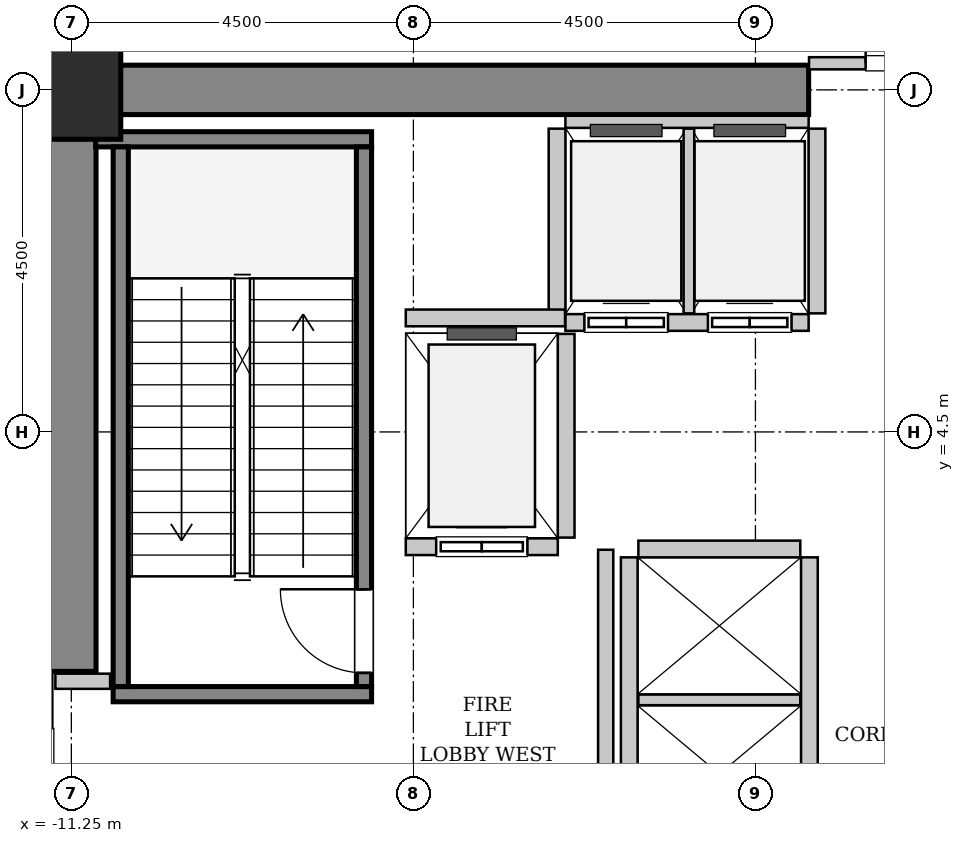
"""IFC4 building model, lengths in metres.
Left out: names, types, materials, properties, quantities, classifications, styles, units other than length and angle.
Written with IfcOpenShell. Run it as: python <this file> out.ifc"""

import sys

from ifc_helpers import new_model, si_unit, direction, frame, frame_2d, origin, origin_2d, place, context, subcontext, project, spatial, rectangle, hollow_rectangle, extrude, source, transform, mapped, element, fill, save


model = new_model("IFC4")
c1 = context("Model", 3, precision=1e-05, world=origin(), true_north=direction((0.0, 1.0)))
c2 = subcontext(c1, "Body", "Model", "MODEL_VIEW")
j1 = project(units=[si_unit("LENGTHUNIT", "METRE"), si_unit("PLANEANGLEUNIT", "RADIAN")], contexts=[c1])
p1 = place(None, origin())
s1 = spatial("IfcSite", under=j1, at=p1, CompositionType="ELEMENT")
p2 = place(p1, origin())
s2 = spatial("IfcBuilding", under=s1, at=p2, CompositionType="ELEMENT")
p3 = place(p2, frame((0.0, 0.0, 22.2)))
s3 = spatial("IfcBuildingStorey", under=s2, at=p3, CompositionType="ELEMENT", Elevation=22.2)
m1 = source(origin(), c2, "Body", "SweptSolid", [
    extrude(rectangle(XDim=10.025, YDim=0.65, at=frame_2d((5.012, 0.0))), origin(), (0.0, 0.0, 1.0), 5.4),
])
p4 = place(p3, frame((-11.575, 9.0, 0.0), z_axis=(0.0, 0.0, 1.0), x_axis=(1.0, 0.0, 0.0)))
e1 = element("IfcWall", 1, at=p4, inside=s3, PredefinedType="SHEAR", context=c2, shape_type="MappedRepresentation", body=[
    mapped(m1, transform((0.0, 0.0, 0.0), x_axis=(1.0, 0.0, 0.0), y_axis=(0.0, 1.0, 0.0), z_axis=(0.0, 0.0, 1.0), scale=1.0)),
])
m2 = source(origin(), c2, "Body", "SweptSolid", [
    extrude(rectangle(XDim=7.325, YDim=0.65, at=frame_2d((3.663, 0.0))), origin(), (0.0, 0.0, 1.0), 5.4),
])
p5 = place(p3, frame((-11.25, 1.35, 0.0), z_axis=(0.0, 0.0, 1.0), x_axis=(0.0, 1.0, 0.0)))
e2 = element("IfcWall", 2, at=p5, inside=s3, PredefinedType="SHEAR", context=c2, shape_type="MappedRepresentation", body=[
    mapped(m2, transform((0.0, 0.0, 0.0), x_axis=(1.0, 0.0, 0.0), y_axis=(0.0, 1.0, 0.0), z_axis=(0.0, 0.0, 1.0), scale=1.0)),
])
m3 = source(origin(), c2, "Body", "SweptSolid", [
    extrude(hollow_rectangle(XDim=1.3, YDim=1.3, WallThickness=0.065, InnerFilletRadius=0.065, OuterFilletRadius=0.13, at=origin_2d()), origin(), (0.0, 0.0, 1.0), 5.4),
])
p6 = place(p3, frame((-11.25, 9.0, 0.0), z_axis=(0.0, 0.0, 1.0), x_axis=(1.0, 0.0, 0.0)))
e3 = element("IfcColumn", 3, at=p6, inside=s3, PredefinedType="COLUMN", context=c2, shape_type="MappedRepresentation", body=[
    mapped(m3, transform((0.0, 0.0, 0.0), x_axis=(1.0, 0.0, 0.0), y_axis=(0.0, 1.0, 0.0), z_axis=(0.0, 0.0, 1.0), scale=1.0)),
])
m4 = source(origin(), c2, "Body", "SweptSolid", [
    extrude(rectangle(XDim=3.4, YDim=0.2, at=frame_2d((1.7, 0.0))), origin(), (0.0, 0.0, 1.0), 5.4),
])
p7 = place(p3, frame((-7.3, 1.05, 0.0), z_axis=(0.0, 0.0, 1.0), x_axis=(-1.0, 0.0, 0.0)))
e4 = element("IfcWall", 4, at=p7, inside=s3, PredefinedType="SOLIDWALL", context=c2, shape_type="MappedRepresentation", body=[
    mapped(m4, transform((0.0, 0.0, 0.0), x_axis=(1.0, 0.0, 0.0), y_axis=(0.0, 1.0, 0.0), z_axis=(0.0, 0.0, 1.0), scale=1.0)),
])
m5 = source(origin(), c2, "Body", "SweptSolid", [
    extrude(rectangle(XDim=3.63, YDim=0.2, at=frame_2d((1.815, 0.0))), origin(), (0.0, 0.0, 1.0), 5.4),
])
p8 = place(p3, frame((-7.3, 8.35, 0.0), z_axis=(0.0, 0.0, 1.0), x_axis=(-1.0, 0.0, 0.0)))
e5 = element("IfcWall", 5, at=p8, inside=s3, PredefinedType="SOLIDWALL", context=c2, shape_type="MappedRepresentation", body=[
    mapped(m5, transform((0.0, 0.0, 0.0), x_axis=(1.0, 0.0, 0.0), y_axis=(0.0, 1.0, 0.0), z_axis=(0.0, 0.0, 1.0), scale=1.0)),
])
m6 = source(origin(), c2, "Body", "SweptSolid", [
    extrude(rectangle(XDim=7.1, YDim=0.2, at=frame_2d((3.55, 0.0))), origin(), (0.0, 0.0, 1.0), 5.4),
])
p9 = place(p3, frame((-7.4, 1.15, 0.0), z_axis=(0.0, 0.0, 1.0), x_axis=(0.0, 1.0, 0.0)))
e6 = element("IfcWall", 6, at=p9, inside=s3, PredefinedType="SOLIDWALL", context=c2, shape_type="MappedRepresentation", body=[
    mapped(m6, transform((0.0, 0.0, 0.0), x_axis=(1.0, 0.0, 0.0), y_axis=(0.0, 1.0, 0.0), z_axis=(0.0, 0.0, 1.0), scale=1.0)),
])
p10 = place(p9, frame((0.18, 0.0, 0.0)))
e7 = element("IfcOpeningElement", 7, at=p10, cuts=e6, PredefinedType="OPENING", context=c2, shape_type="SweptSolid", body=[
    extrude(rectangle(XDim=1.1, YDim=2.15, at=frame_2d((0.55, 1.075))), frame((0.0, 0.11, 0.0), z_axis=(0.0, -1.0, 0.0), x_axis=(1.0, 0.0, 0.0)), (0.0, 0.0, 1.0), 0.22),
])
p11 = place(p3, frame((-10.6, 1.15, 0.0), z_axis=(0.0, 0.0, 1.0), x_axis=(0.0, 1.0, 0.0)))
e8 = element("IfcWall", 8, at=p11, inside=s3, PredefinedType="SOLIDWALL", context=c2, shape_type="MappedRepresentation", body=[
    mapped(m6, transform((0.0, 0.0, 0.0), x_axis=(1.0, 0.0, 0.0), y_axis=(0.0, 1.0, 0.0), z_axis=(0.0, 0.0, 1.0), scale=1.0)),
])
m7 = source(origin(), c2, "Body", "SweptSolid", [
    extrude(rectangle(XDim=2.0, YDim=0.22, at=frame_2d((1.0, 0.0))), origin(), (0.0, 0.0, 1.0), 4.905),
])
p12 = place(p3, frame((-6.85, 2.99, 0.0), z_axis=(0.0, 0.0, 1.0), x_axis=(1.0, 0.0, 0.0)))
e9 = element("IfcWall", 9, at=p12, inside=s3, PredefinedType="SOLIDWALL", context=c2, shape_type="MappedRepresentation", body=[
    mapped(m7, transform((0.0, 0.0, 0.0), x_axis=(1.0, 0.0, 0.0), y_axis=(0.0, 1.0, 0.0), z_axis=(0.0, 0.0, 1.0), scale=1.0)),
])
p13 = place(p12, frame((0.4, 0.0, 0.0)))
e10 = element("IfcOpeningElement", 10, at=p13, cuts=e9, PredefinedType="OPENING", context=c2, shape_type="SweptSolid", body=[
    extrude(rectangle(XDim=1.2, YDim=2.2, at=frame_2d((0.6, 1.1))), frame((0.0, 0.12, 0.0), z_axis=(0.0, -1.0, 0.0), x_axis=(1.0, 0.0, 0.0)), (0.0, 0.0, 1.0), 0.24),
])
m8 = source(origin(), c2, "Body", "SweptSolid", [
    extrude(rectangle(XDim=2.68, YDim=0.22, at=frame_2d((1.34, 0.0))), origin(), (0.0, 0.0, 1.0), 4.905),
])
p14 = place(p3, frame((-4.74, 3.11, 0.0), z_axis=(0.0, 0.0, 1.0), x_axis=(0.0, 1.0, 0.0)))
e11 = element("IfcWall", 11, at=p14, inside=s3, PredefinedType="SOLIDWALL", context=c2, shape_type="MappedRepresentation", body=[
    mapped(m8, transform((0.0, 0.0, 0.0), x_axis=(1.0, 0.0, 0.0), y_axis=(0.0, 1.0, 0.0), z_axis=(0.0, 0.0, 1.0), scale=1.0)),
])
m9 = source(origin(), c2, "Body", "SweptSolid", [
    extrude(rectangle(XDim=3.2, YDim=0.22, at=frame_2d((1.6, 0.0))), origin(), (0.0, 0.0, 1.0), 4.905),
])
p15 = place(p3, frame((-4.75, 5.94, 0.0), z_axis=(0.0, 0.0, 1.0), x_axis=(1.0, 0.0, 0.0)))
e12 = element("IfcWall", 12, at=p15, inside=s3, PredefinedType="SOLIDWALL", context=c2, shape_type="MappedRepresentation", body=[
    mapped(m9, transform((0.0, 0.0, 0.0), x_axis=(1.0, 0.0, 0.0), y_axis=(0.0, 1.0, 0.0), z_axis=(0.0, 0.0, 1.0), scale=1.0)),
])
p16 = place(p15, frame((0.25, 0.0, 0.0)))
e13 = element("IfcOpeningElement", 13, at=p16, cuts=e12, PredefinedType="OPENING", context=c2, shape_type="SweptSolid", body=[
    extrude(rectangle(XDim=1.1, YDim=2.2, at=frame_2d((0.55, 1.1))), frame((0.0, 0.12, 0.0), z_axis=(0.0, -1.0, 0.0), x_axis=(1.0, 0.0, 0.0)), (0.0, 0.0, 1.0), 0.24),
])
p17 = place(p15, frame((1.875, 0.0, 0.0)))
e14 = element("IfcOpeningElement", 14, at=p17, cuts=e12, PredefinedType="OPENING", context=c2, shape_type="SweptSolid", body=[
    extrude(rectangle(XDim=1.1, YDim=2.2, at=frame_2d((0.55, 1.1))), frame((0.0, 0.12, 0.0), z_axis=(0.0, -1.0, 0.0), x_axis=(1.0, 0.0, 0.0)), (0.0, 0.0, 1.0), 0.24),
])
m10 = source(origin(), c2, "Body", "SweptSolid", [
    extrude(rectangle(XDim=3.2, YDim=0.16, at=frame_2d((1.6, 0.0))), origin(), (0.0, 0.0, 1.0), 3.795),
])
p18 = place(p3, frame((-1.55, 8.58, 0.0), z_axis=(0.0, 0.0, 1.0), x_axis=(-1.0, 0.0, 0.0)))
e15 = element("IfcWall", 15, at=p18, inside=s3, PredefinedType="PARTITIONING", context=c2, shape_type="MappedRepresentation", body=[
    mapped(m10, transform((0.0, 0.0, 0.0), x_axis=(1.0, 0.0, 0.0), y_axis=(0.0, 1.0, 0.0), z_axis=(0.0, 0.0, 1.0), scale=1.0)),
])
m11 = source(origin(), c2, "Body", "SweptSolid", [
    extrude(rectangle(XDim=2.43, YDim=0.22, at=frame_2d((1.215, 0.0))), origin(), (0.0, 0.0, 1.0), 4.905),
])
p19 = place(p3, frame((-4.86, 8.49, 0.0), z_axis=(0.0, 0.0, 1.0), x_axis=(0.0, -1.0, 0.0)))
e16 = element("IfcWall", 16, at=p19, inside=s3, PredefinedType="SOLIDWALL", context=c2, shape_type="MappedRepresentation", body=[
    mapped(m11, transform((0.0, 0.0, 0.0), x_axis=(1.0, 0.0, 0.0), y_axis=(0.0, 1.0, 0.0), z_axis=(0.0, 0.0, 1.0), scale=1.0)),
])
m12 = source(origin(), c2, "Body", "SweptSolid", [
    extrude(rectangle(XDim=2.43, YDim=0.14, at=frame_2d((1.215, 0.0))), origin(), (0.0, 0.0, 1.0), 4.905),
])
p20 = place(p3, frame((-3.125, 6.06, 0.0), z_axis=(0.0, 0.0, 1.0), x_axis=(0.0, 1.0, 0.0)))
e17 = element("IfcWall", 17, at=p20, inside=s3, PredefinedType="PARTITIONING", context=c2, shape_type="MappedRepresentation", body=[
    mapped(m12, transform((0.0, 0.0, 0.0), x_axis=(1.0, 0.0, 0.0), y_axis=(0.0, 1.0, 0.0), z_axis=(0.0, 0.0, 1.0), scale=1.0)),
])
p21 = place(p3, frame((-1.44, 6.06, 0.0), z_axis=(0.0, 0.0, 1.0), x_axis=(0.0, 1.0, 0.0)))
e18 = element("IfcWall", 18, at=p21, inside=s3, PredefinedType="SOLIDWALL", context=c2, shape_type="MappedRepresentation", body=[
    mapped(m11, transform((0.0, 0.0, 0.0), x_axis=(1.0, 0.0, 0.0), y_axis=(0.0, 1.0, 0.0), z_axis=(0.0, 0.0, 1.0), scale=1.0)),
])
m13 = source(origin(), c2, "Body", "SweptSolid", [
    extrude(rectangle(XDim=5.7, YDim=0.22, at=frame_2d((2.85, 0.0))), origin(), (0.0, 0.0, 1.0), 4.905),
])
for number, where, z_axis, x_axis in (
    (19, (-1.54, -2.85, 0.0), (0.0, 0.0, 1.0), (0.0, 1.0, 0.0)),
    (20, (-3.91, 2.85, 0.0), (0.0, 0.0, 1.0), (0.0, -1.0, 0.0)),
):
    element("IfcWall", number, at=place(p3, frame(where, z_axis=z_axis, x_axis=x_axis)), inside=s3, PredefinedType="SOLIDWALL", context=c2, shape_type="MappedRepresentation", body=[
        mapped(m13, transform((0.0, 0.0, 0.0), x_axis=(1.0, 0.0, 0.0), y_axis=(0.0, 1.0, 0.0), z_axis=(0.0, 0.0, 1.0), scale=1.0)),
    ])
m14 = source(origin(), c2, "Body", "SweptSolid", [
    extrude(rectangle(XDim=2.13, YDim=0.14, at=frame_2d((1.065, 0.0))), origin(), (0.0, 0.0, 1.0), 4.905),
])
p22 = place(p3, frame((-3.79, 0.975, 0.0), z_axis=(0.0, 0.0, 1.0), x_axis=(1.0, 0.0, 0.0)))
e21 = element("IfcWall", 21, at=p22, inside=s3, PredefinedType="PARTITIONING", context=c2, shape_type="MappedRepresentation", body=[
    mapped(m14, transform((0.0, 0.0, 0.0), x_axis=(1.0, 0.0, 0.0), y_axis=(0.0, 1.0, 0.0), z_axis=(0.0, 0.0, 1.0), scale=1.0)),
])
m15 = source(origin(), c2, "Body", "SweptSolid", [
    extrude(rectangle(XDim=2.13, YDim=0.22, at=frame_2d((1.065, 0.0))), origin(), (0.0, 0.0, 1.0), 4.905),
])
p23 = place(p3, frame((-1.66, 2.96, 0.0), z_axis=(0.0, 0.0, 1.0), x_axis=(-1.0, 0.0, 0.0)))
e22 = element("IfcWall", 22, at=p23, inside=s3, PredefinedType="SOLIDWALL", context=c2, shape_type="MappedRepresentation", body=[
    mapped(m15, transform((0.0, 0.0, 0.0), x_axis=(1.0, 0.0, 0.0), y_axis=(0.0, 1.0, 0.0), z_axis=(0.0, 0.0, 1.0), scale=1.0)),
])
m16 = source(origin(), c2, "Body", "SweptSolid", [
    extrude(rectangle(XDim=2.095, YDim=0.22, at=frame_2d((1.048, 0.0))), origin(), (0.0, 0.0, 1.0), 4.905),
])
p24 = place(p3, frame((-6.85, 6.0, 0.0), z_axis=(0.0, 0.0, 1.0), x_axis=(1.0, 0.0, 0.0)))
e23 = element("IfcWall", 23, at=p24, inside=s3, PredefinedType="SOLIDWALL", context=c2, shape_type="MappedRepresentation", body=[
    mapped(m16, transform((0.0, 0.0, 0.0), x_axis=(1.0, 0.0, 0.0), y_axis=(0.0, 1.0, 0.0), z_axis=(0.0, 0.0, 1.0), scale=1.0)),
])
m17 = source(origin(), c2, "Body", "SweptSolid", [
    extrude(rectangle(XDim=5.9, YDim=0.2, at=frame_2d((2.95, 0.0))), origin(), (0.0, 0.0, 1.0), 4.905),
])
p25 = place(p3, frame((-4.22, -2.95, 0.0), z_axis=(0.0, 0.0, 1.0), x_axis=(0.0, 1.0, 0.0)))
e24 = element("IfcWall", 24, at=p25, inside=s3, PredefinedType="PARTITIONING", context=c2, shape_type="MappedRepresentation", body=[
    mapped(m17, transform((0.0, 0.0, 0.0), x_axis=(1.0, 0.0, 0.0), y_axis=(0.0, 1.0, 0.0), z_axis=(0.0, 0.0, 1.0), scale=1.0)),
])
m18 = source(origin(), c2, "Body", "SweptSolid", [
    extrude(rectangle(XDim=0.72, YDim=0.2, at=frame_2d((0.36, 0.0))), origin(), (0.0, 0.0, 1.0), 4.905),
])
p26 = place(p3, frame((-11.46, 1.22, 0.0), z_axis=(0.0, 0.0, 1.0), x_axis=(1.0, 0.0, 0.0)))
e25 = element("IfcWall", 25, at=p26, inside=s3, PredefinedType="PARTITIONING", context=c2, shape_type="MappedRepresentation", body=[
    mapped(m18, transform((0.0, 0.0, 0.0), x_axis=(1.0, 0.0, 0.0), y_axis=(0.0, 1.0, 0.0), z_axis=(0.0, 0.0, 1.0), scale=1.0)),
])
m19 = source(origin(), c2, "Body", "SweptSolid", [
    extrude(rectangle(XDim=3.09, YDim=0.16, at=frame_2d((1.545, 0.0))), origin(), (0.0, 0.0, 1.0), 3.795),
])
p27 = place(p3, frame((-1.545, 9.35, 0.0), z_axis=(0.0, 0.0, 1.0), x_axis=(1.0, 0.0, 0.0)))
e26 = element("IfcWall", 26, at=p27, inside=s3, PredefinedType="PARTITIONING", context=c2, shape_type="MappedRepresentation", body=[
    mapped(m19, transform((0.0, 0.0, 0.0), x_axis=(1.0, 0.0, 0.0), y_axis=(0.0, 1.0, 0.0), z_axis=(0.0, 0.0, 1.0), scale=1.0)),
])
p28 = place(p27, frame((0.745, 0.0, 0.0)))
e27 = element("IfcOpeningElement", 27, at=p28, cuts=e26, PredefinedType="OPENING", context=c2, shape_type="SweptSolid", body=[
    extrude(rectangle(XDim=1.6, YDim=2.3, at=frame_2d((0.8, 1.15))), frame((0.0, 0.09, 0.0), z_axis=(0.0, -1.0, 0.0), x_axis=(1.0, 0.0, 0.0)), (0.0, 0.0, 1.0), 0.18),
])
m20 = source(origin(), c2, "Body", "SweptSolid", [
    extrude(rectangle(XDim=1.1, YDim=2.15, at=frame_2d((0.55, 1.075))), frame((0.0, 0.025, 0.0), z_axis=(0.0, -1.0, 0.0), x_axis=(1.0, 0.0, 0.0)), (0.0, 0.0, 1.0), 0.05),
])
p29 = place(p10, origin())
e28 = element("IfcDoor", 28, at=p29, inside=s3, OperationType="SINGLE_SWING_RIGHT", PredefinedType="DOOR", context=c2, shape_type="MappedRepresentation", body=[
    mapped(m20, transform((0.0, 0.0, 0.0), x_axis=(1.0, 0.0, 0.0), y_axis=(0.0, 1.0, 0.0), z_axis=(0.0, 0.0, 1.0), scale=1.0)),
])
fill(e7, e28)
m21 = source(origin(), c2, "Body", "SweptSolid", [
    extrude(rectangle(XDim=1.2, YDim=2.2, at=frame_2d((0.6, 1.1))), frame((0.0, 0.025, 0.0), z_axis=(0.0, -1.0, 0.0), x_axis=(1.0, 0.0, 0.0)), (0.0, 0.0, 1.0), 0.05),
])
p30 = place(p13, origin())
e29 = element("IfcDoor", 29, at=p30, inside=s3, OperationType="SLIDING_TO_LEFT", PredefinedType="DOOR", context=c2, shape_type="MappedRepresentation", body=[
    mapped(m21, transform((0.0, 0.0, 0.0), x_axis=(1.0, 0.0, 0.0), y_axis=(0.0, 1.0, 0.0), z_axis=(0.0, 0.0, 1.0), scale=1.0)),
])
fill(e10, e29)
m22 = source(origin(), c2, "Body", "SweptSolid", [
    extrude(rectangle(XDim=1.1, YDim=2.2, at=frame_2d((0.55, 1.1))), frame((0.0, 0.025, 0.0), z_axis=(0.0, -1.0, 0.0), x_axis=(1.0, 0.0, 0.0)), (0.0, 0.0, 1.0), 0.05),
])
p31 = place(p16, origin())
e30 = element("IfcDoor", 30, at=p31, inside=s3, OperationType="DOUBLE_DOOR_SLIDING", PredefinedType="DOOR", context=c2, shape_type="MappedRepresentation", body=[
    mapped(m22, transform((0.0, 0.0, 0.0), x_axis=(1.0, 0.0, 0.0), y_axis=(0.0, 1.0, 0.0), z_axis=(0.0, 0.0, 1.0), scale=1.0)),
])
fill(e13, e30)
p32 = place(p17, origin())
e31 = element("IfcDoor", 31, at=p32, inside=s3, OperationType="DOUBLE_DOOR_SLIDING", PredefinedType="DOOR", context=c2, shape_type="MappedRepresentation", body=[
    mapped(m22, transform((0.0, 0.0, 0.0), x_axis=(1.0, 0.0, 0.0), y_axis=(0.0, 1.0, 0.0), z_axis=(0.0, 0.0, 1.0), scale=1.0)),
])
fill(e14, e31)
m23 = source(origin(), c2, "Body", "SweptSolid", [
    extrude(rectangle(XDim=1.6, YDim=2.3, at=frame_2d((0.8, 1.15))), frame((0.0, 0.025, 0.0), z_axis=(0.0, -1.0, 0.0), x_axis=(1.0, 0.0, 0.0)), (0.0, 0.0, 1.0), 0.05),
])
p33 = place(p28, origin())
e32 = element("IfcDoor", 32, at=p33, inside=s3, OperationType="DOUBLE_DOOR_SINGLE_SWING", PredefinedType="DOOR", context=c2, shape_type="MappedRepresentation", body=[
    mapped(m23, transform((0.0, 0.0, 0.0), x_axis=(1.0, 0.0, 0.0), y_axis=(0.0, 1.0, 0.0), z_axis=(0.0, 0.0, 1.0), scale=1.0)),
])
fill(e27, e32)
save(model, sys.argv[1])
